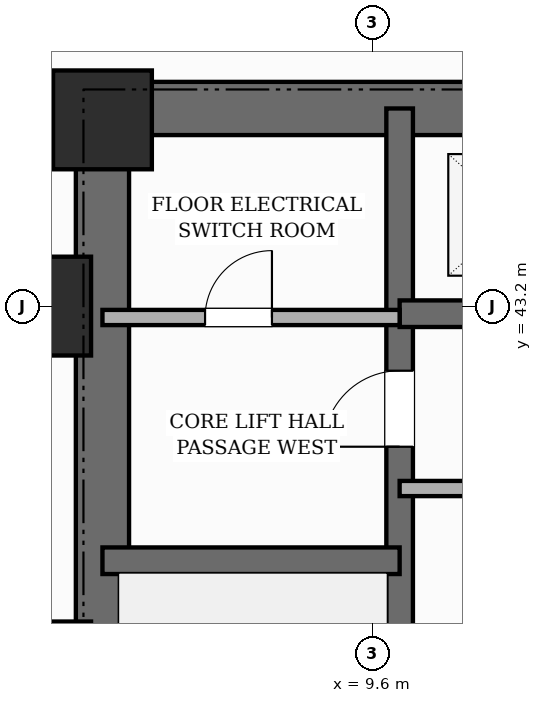
"""IFC4 building model, lengths in metres.
Left out: names, types, materials, properties, quantities, classifications, styles, units other than length and angle.
Written with IfcOpenShell. Run it as: python <this file> out.ifc"""

import sys

from ifc_helpers import new_model, si_unit, direction, frame, frame_2d, origin, origin_2d, place, context, subcontext, project, spatial, rectangle, extrude, element, fill, save


model = new_model("IFC4")
c1 = context("Model", 3, precision=1e-05, world=origin(), true_north=direction((0.0, 1.0)))
c2 = subcontext(c1, "Body", "Model", "MODEL_VIEW")
j1 = project(units=[si_unit("LENGTHUNIT", "METRE"), si_unit("PLANEANGLEUNIT", "RADIAN")], contexts=[c1])
p1 = place(None, origin())
s1 = spatial("IfcSite", under=j1, at=p1, CompositionType="ELEMENT")
p2 = place(p1, origin())
s2 = spatial("IfcBuilding", under=s1, at=p2, CompositionType="ELEMENT")
p3 = place(p2, frame((0.0, 0.0, -13.2)))
s3 = spatial("IfcBuildingStorey", under=s2, at=p3, CompositionType="ELEMENT", Elevation=-13.2)
p4 = place(p3, frame((6.05, 30.55, 0.0), z_axis=(0.0, 0.0, 1.0), x_axis=(0.0, 1.0, 0.0)))
e1 = element("IfcWall", 1, at=p4, inside=s3, PredefinedType="SHEAR", context=c2, shape_type="SweptSolid", body=[
    extrude(rectangle(XDim=15.6, YDim=0.7, at=frame_2d((7.8, 0.0))), origin(), (0.0, 0.0, 1.0), 4.4),
])
p5 = place(p3, frame((6.05, 45.8, 0.0), z_axis=(0.0, 0.0, 1.0), x_axis=(1.0, 0.0, 0.0)))
e2 = element("IfcWall", 2, at=p5, inside=s3, PredefinedType="SHEAR", context=c2, shape_type="SweptSolid", body=[
    extrude(rectangle(XDim=16.7, YDim=0.7, at=frame_2d((8.35, 0.0))), origin(), (0.0, 0.0, 1.0), 4.4),
])
p6 = place(p3, frame((9.96, 30.9, 0.0), z_axis=(0.0, 0.0, 1.0), x_axis=(0.0, 1.0, 0.0)))
e3 = element("IfcWall", 3, at=p6, inside=s3, PredefinedType="SHEAR", context=c2, shape_type="SweptSolid", body=[
    extrude(rectangle(XDim=14.9, YDim=0.35, at=frame_2d((7.45, 0.0))), origin(), (0.0, 0.0, 1.0), 4.4),
])
p7 = place(p6, frame((0.65, 0.0, 0.0)))
e4 = element("IfcOpeningElement", 4, at=p7, cuts=e3, PredefinedType="OPENING", context=c2, shape_type="SweptSolid", body=[
    extrude(rectangle(XDim=0.95, YDim=2.1, at=frame_2d((0.475, 1.05))), frame((0.0, 0.185, 0.0), z_axis=(0.0, -1.0, 0.0), x_axis=(1.0, 0.0, 0.0)), (0.0, 0.0, 1.0), 0.37),
])
p8 = place(p6, frame((10.45, 0.0, 0.0)))
e5 = element("IfcOpeningElement", 5, at=p8, cuts=e3, PredefinedType="OPENING", context=c2, shape_type="SweptSolid", body=[
    extrude(rectangle(XDim=1.0, YDim=2.15, at=frame_2d((0.5, 1.075))), frame((0.0, 0.185, 0.0), z_axis=(0.0, -1.0, 0.0), x_axis=(1.0, 0.0, 0.0)), (0.0, 0.0, 1.0), 0.37),
])
p9 = place(p3, frame((6.05, 39.85, 0.0), z_axis=(0.0, 0.0, 1.0), x_axis=(1.0, 0.0, 0.0)))
e6 = element("IfcWall", 6, at=p9, inside=s3, PredefinedType="SHEAR", context=c2, shape_type="SweptSolid", body=[
    extrude(rectangle(XDim=3.91, YDim=0.35, at=frame_2d((1.955, 0.0))), origin(), (0.0, 0.0, 1.0), 4.4),
])
p10 = place(p3, frame((9.96, 43.1, 0.0), z_axis=(0.0, 0.0, 1.0), x_axis=(1.0, 0.0, 0.0)))
e7 = element("IfcWall", 7, at=p10, inside=s3, PredefinedType="SHEAR", context=c2, shape_type="SweptSolid", body=[
    extrude(rectangle(XDim=8.88, YDim=0.35, at=frame_2d((4.44, 0.0))), origin(), (0.0, 0.0, 1.0), 4.4),
])
p11 = place(p10, frame((0.99, 0.0, 0.0)))
e8 = element("IfcOpeningElement", 8, at=p11, cuts=e7, PredefinedType="OPENING", context=c2, shape_type="SweptSolid", body=[
    extrude(rectangle(XDim=1.1, YDim=2.15, at=frame_2d((0.55, 1.075))), frame((0.0, 0.185, 0.0), z_axis=(0.0, -1.0, 0.0), x_axis=(1.0, 0.0, 0.0)), (0.0, 0.0, 1.0), 0.37),
])
p12 = place(p10, frame((3.89, 0.0, 0.0)))
e9 = element("IfcOpeningElement", 9, at=p12, cuts=e7, PredefinedType="OPENING", context=c2, shape_type="SweptSolid", body=[
    extrude(rectangle(XDim=1.1, YDim=2.15, at=frame_2d((0.55, 1.075))), frame((0.0, 0.185, 0.0), z_axis=(0.0, -1.0, 0.0), x_axis=(1.0, 0.0, 0.0)), (0.0, 0.0, 1.0), 0.37),
])
p13 = place(p10, frame((6.79, 0.0, 0.0)))
e10 = element("IfcOpeningElement", 10, at=p13, cuts=e7, PredefinedType="OPENING", context=c2, shape_type="SweptSolid", body=[
    extrude(rectangle(XDim=1.1, YDim=2.15, at=frame_2d((0.55, 1.075))), frame((0.0, 0.185, 0.0), z_axis=(0.0, -1.0, 0.0), x_axis=(1.0, 0.0, 0.0)), (0.0, 0.0, 1.0), 0.37),
])
for number, where, z_axis, x_axis in (
    (11, (5.25, 38.4, 0.0), (0.0, 0.0, 1.0), (1.0, 0.0, 0.0)),
    (12, (5.25, 43.2, 0.0), (0.0, 0.0, 1.0), (1.0, 0.0, 0.0)),
    (13, (6.05, 45.65, 0.0), (0.0, 0.0, 1.0), (1.0, 0.0, 0.0)),
):
    element("IfcColumn", number, at=place(p3, frame(where, z_axis=z_axis, x_axis=x_axis)), inside=s3, PredefinedType="COLUMN", context=c2, shape_type="SweptSolid", body=[
        extrude(rectangle(XDim=1.3, YDim=1.3, at=origin_2d()), origin(), (0.0, 0.0, 1.0), 4.4),
    ])
p14 = place(p3, frame((9.96, 40.8, 0.0), z_axis=(0.0, 0.0, 1.0), x_axis=(1.0, 0.0, 0.0)))
e14 = element("IfcWall", 14, at=p14, inside=s3, PredefinedType="POLYGONAL", context=c2, shape_type="SweptSolid", body=[
    extrude(rectangle(XDim=8.88, YDim=0.2, at=frame_2d((4.44, 0.0))), origin(), (0.0, 0.0, 1.0), 4.08),
])
p15 = place(p14, frame((7.5, 0.0, 0.0)))
e15 = element("IfcOpeningElement", 15, at=p15, cuts=e14, PredefinedType="OPENING", context=c2, shape_type="SweptSolid", body=[
    extrude(rectangle(XDim=0.88, YDim=2.1, at=frame_2d((0.44, 1.05))), frame((0.0, 0.11, 0.0), z_axis=(0.0, -1.0, 0.0), x_axis=(1.0, 0.0, 0.0)), (0.0, 0.0, 1.0), 0.22),
])
p16 = place(p14, frame((1.7, 0.0, 0.0)))
e16 = element("IfcOpeningElement", 16, at=p16, cuts=e14, PredefinedType="OPENING", context=c2, shape_type="SweptSolid", body=[
    extrude(rectangle(XDim=0.88, YDim=2.1, at=frame_2d((0.44, 1.05))), frame((0.0, 0.11, 0.0), z_axis=(0.0, -1.0, 0.0), x_axis=(1.0, 0.0, 0.0)), (0.0, 0.0, 1.0), 0.22),
])
p17 = place(p14, frame((4.9, 0.0, 0.0)))
e17 = element("IfcOpeningElement", 17, at=p17, cuts=e14, PredefinedType="OPENING", context=c2, shape_type="SweptSolid", body=[
    extrude(rectangle(XDim=0.88, YDim=2.1, at=frame_2d((0.44, 1.05))), frame((0.0, 0.11, 0.0), z_axis=(0.0, -1.0, 0.0), x_axis=(1.0, 0.0, 0.0)), (0.0, 0.0, 1.0), 0.22),
])
p18 = place(p3, frame((6.05, 43.05, 0.0), z_axis=(0.0, 0.0, 1.0), x_axis=(1.0, 0.0, 0.0)))
e18 = element("IfcWall", 18, at=p18, inside=s3, PredefinedType="POLYGONAL", context=c2, shape_type="SweptSolid", body=[
    extrude(rectangle(XDim=3.91, YDim=0.2, at=frame_2d((1.955, 0.0))), origin(), (0.0, 0.0, 1.0), 3.28),
])
p19 = place(p18, frame((1.35, 0.0, 0.0)))
e19 = element("IfcOpeningElement", 19, at=p19, cuts=e18, PredefinedType="OPENING", context=c2, shape_type="SweptSolid", body=[
    extrude(rectangle(XDim=0.88, YDim=2.1, at=frame_2d((0.44, 1.05))), frame((0.0, 0.11, 0.0), z_axis=(0.0, -1.0, 0.0), x_axis=(1.0, 0.0, 0.0)), (0.0, 0.0, 1.0), 0.22),
])
p20 = place(p8, origin())
e20 = element("IfcDoor", 20, at=p20, inside=s3, OperationType="SINGLE_SWING_LEFT", PredefinedType="DOOR", context=c2, shape_type="SweptSolid", body=[
    extrude(rectangle(XDim=1.0, YDim=2.15, at=frame_2d((0.5, 1.075))), frame((0.0, 0.025, 0.0), z_axis=(0.0, -1.0, 0.0), x_axis=(1.0, 0.0, 0.0)), (0.0, 0.0, 1.0), 0.05),
])
fill(e5, e20)
p21 = place(p19, origin())
e21 = element("IfcDoor", 21, at=p21, inside=s3, OperationType="SINGLE_SWING_RIGHT", PredefinedType="DOOR", context=c2, shape_type="SweptSolid", body=[
    extrude(rectangle(XDim=0.88, YDim=2.1, at=frame_2d((0.44, 1.05))), frame((0.0, 0.025, 0.0), z_axis=(0.0, -1.0, 0.0), x_axis=(1.0, 0.0, 0.0)), (0.0, 0.0, 1.0), 0.05),
])
fill(e19, e21)
save(model, sys.argv[1])
